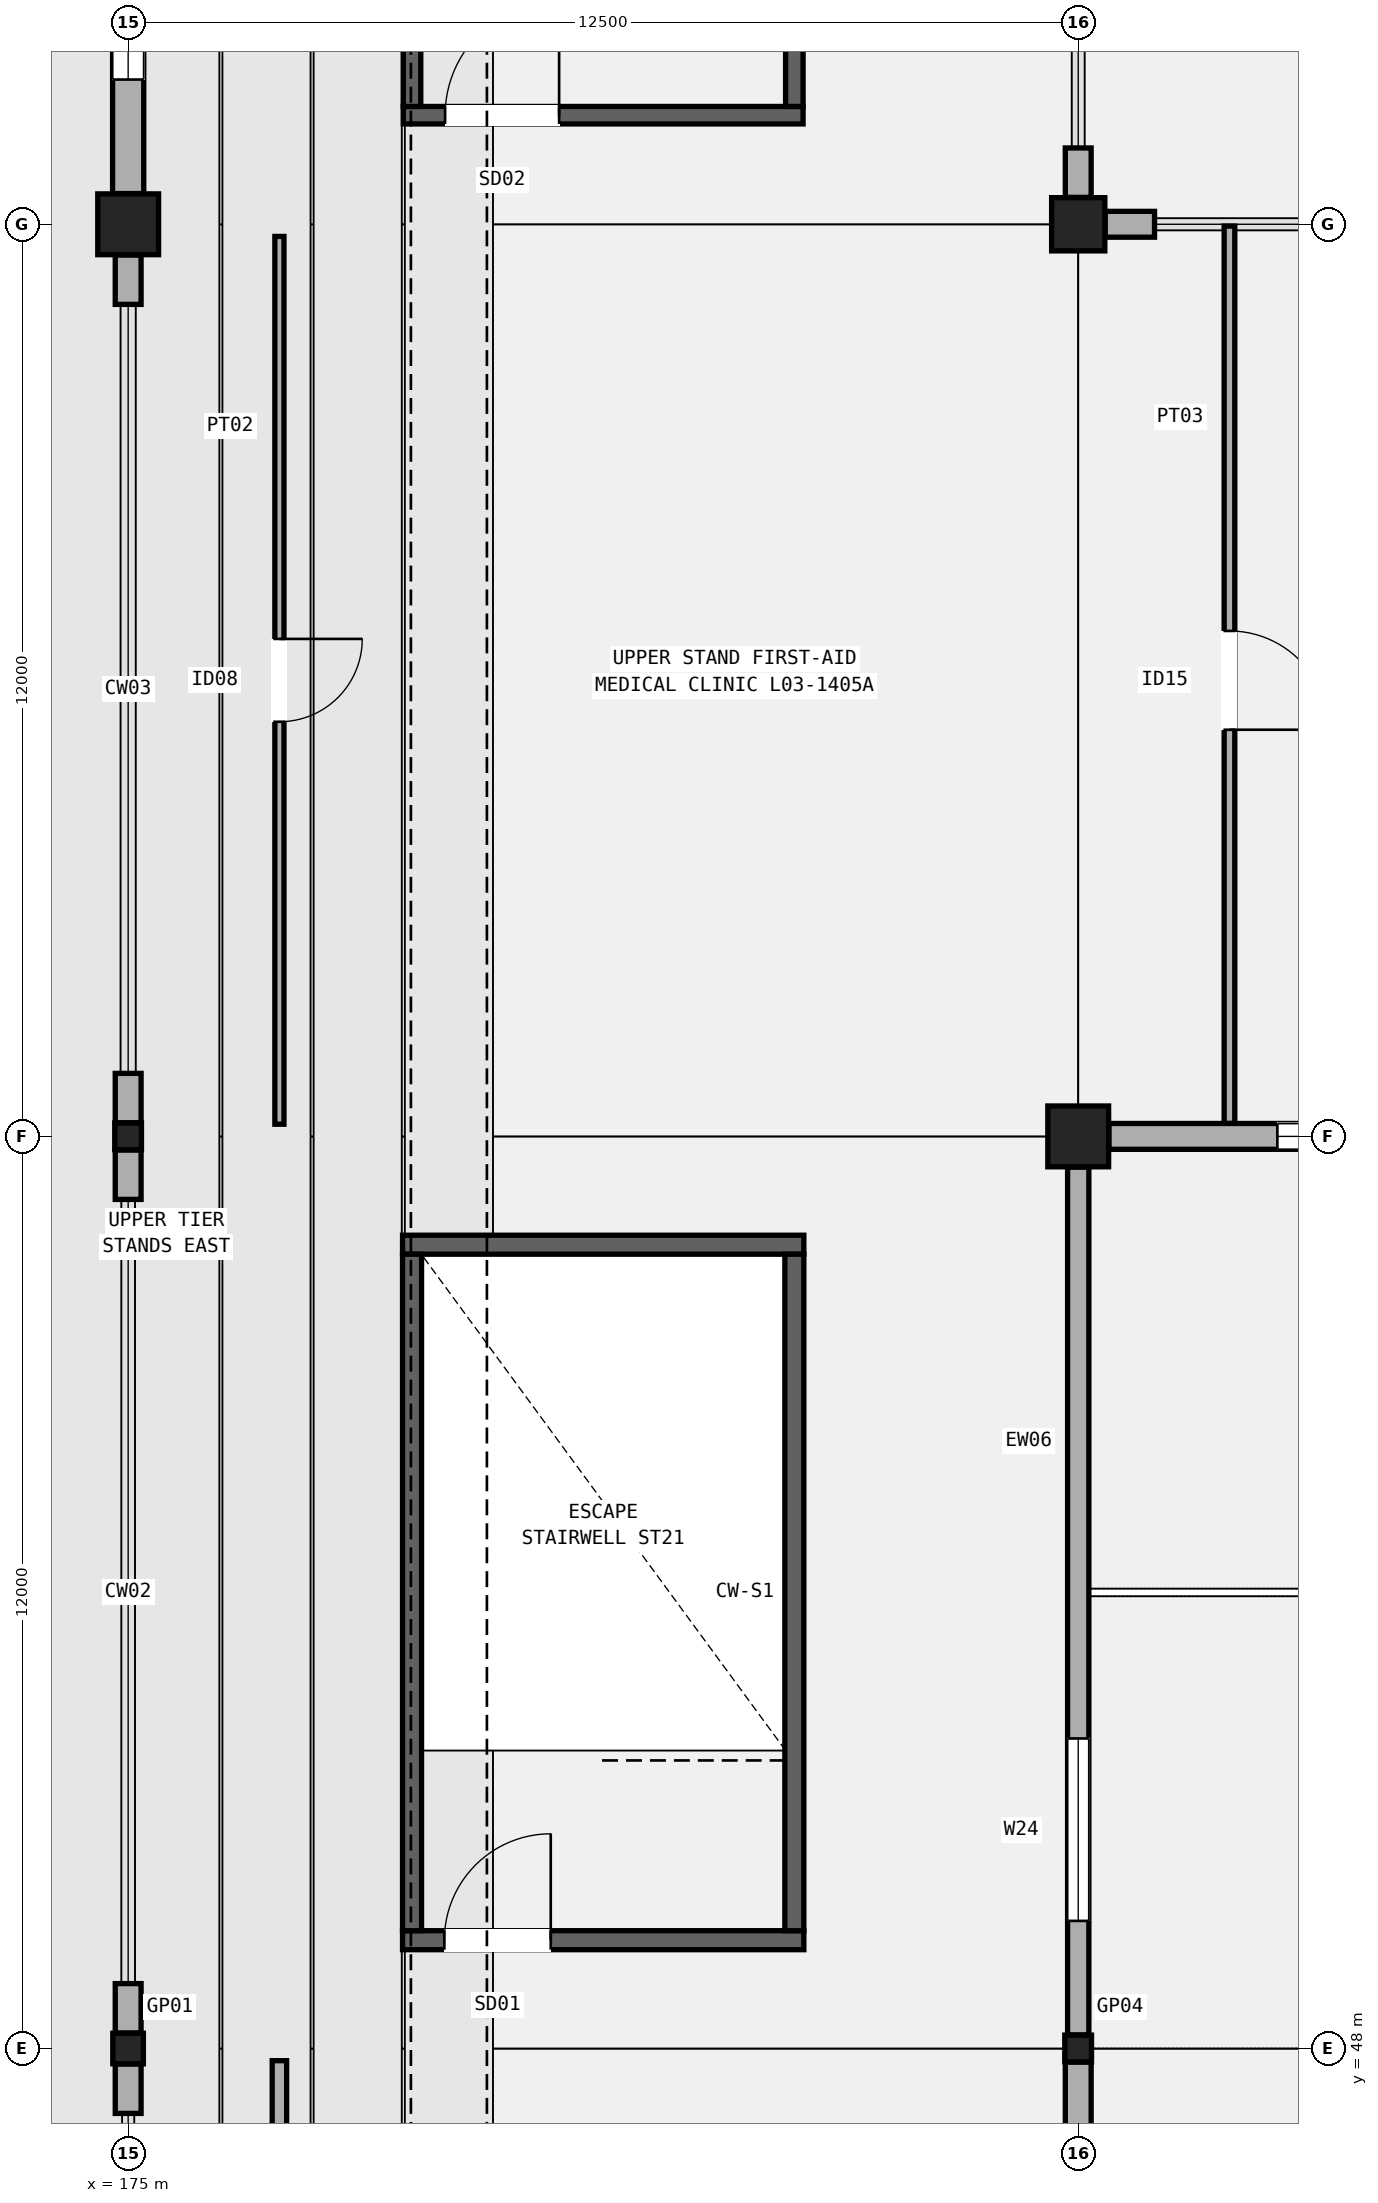
"""IFC4 building model, lengths in metres.
Left out: names, types, materials, properties, quantities, classifications, styles, units other than length and angle.
Written with IfcOpenShell. Run it as: python <this file> out.ifc"""

import sys

from ifc_helpers import new_model, si_unit, direction, frame, frame_2d, origin, origin_2d, place, context, subcontext, project, spatial, rectangle, hollow_rectangle, extrude, element, fill, save


model = new_model("IFC4")
c1 = context("Model", 3, precision=1e-05, world=origin(), true_north=direction((0.0, 1.0)))
c2 = subcontext(c1, "Body", "Model", "MODEL_VIEW")
j1 = project(units=[si_unit("LENGTHUNIT", "METRE"), si_unit("PLANEANGLEUNIT", "RADIAN")], contexts=[c1])
p1 = place(None, origin())
s1 = spatial("IfcSite", under=j1, at=p1, CompositionType="ELEMENT")
p2 = place(p1, origin())
s2 = spatial("IfcBuilding", under=s1, at=p2, CompositionType="ELEMENT")
p3 = place(p2, frame((0.0, 0.0, 15.3)))
s3 = spatial("IfcBuildingStorey", under=s2, at=p3, CompositionType="ELEMENT", Elevation=15.3)
p4 = place(p3, frame((175.0, 48.0, 0.0), z_axis=(0.0, 0.0, 1.0), x_axis=(1.0, 0.0, 0.0)))
e1 = element("IfcColumn", 1, at=p4, inside=s3, PredefinedType="COLUMN", context=c2, shape_type="SweptSolid", body=[
    extrude(hollow_rectangle(XDim=0.4, YDim=0.4, WallThickness=0.016, InnerFilletRadius=0.016, OuterFilletRadius=0.032, at=origin_2d()), origin(), (0.0, 0.0, 1.0), 5.1),
])
p5 = place(p3, frame((175.0, 60.0, 0.0), z_axis=(0.0, 0.0, 1.0), x_axis=(1.0, 0.0, 0.0)))
e2 = element("IfcColumn", 2, at=p5, inside=s3, PredefinedType="COLUMN", context=c2, shape_type="SweptSolid", body=[
    extrude(hollow_rectangle(XDim=0.35, YDim=0.35, WallThickness=0.016, InnerFilletRadius=0.016, OuterFilletRadius=0.032, at=origin_2d()), origin(), (0.0, 0.0, 1.0), 5.1),
])
p6 = place(p3, frame((175.0, 72.0, 0.0), z_axis=(0.0, 0.0, 1.0), x_axis=(1.0, 0.0, 0.0)))
e3 = element("IfcColumn", 3, at=p6, inside=s3, PredefinedType="COLUMN", context=c2, shape_type="SweptSolid", body=[
    extrude(rectangle(XDim=0.8, YDim=0.8, at=origin_2d()), origin(), (0.0, 0.0, 1.0), 5.1),
])
p7 = place(p3, frame((187.5, 48.0, 0.0), z_axis=(0.0, 0.0, 1.0), x_axis=(1.0, 0.0, 0.0)))
e4 = element("IfcColumn", 4, at=p7, inside=s3, PredefinedType="COLUMN", context=c2, shape_type="SweptSolid", body=[
    extrude(hollow_rectangle(XDim=0.35, YDim=0.35, WallThickness=0.016, InnerFilletRadius=0.016, OuterFilletRadius=0.032, at=origin_2d()), origin(), (0.0, 0.0, 1.0), 5.1),
])
p8 = place(p3, frame((187.5, 60.0, 0.0), z_axis=(0.0, 0.0, 1.0), x_axis=(1.0, 0.0, 0.0)))
e5 = element("IfcColumn", 5, at=p8, inside=s3, PredefinedType="COLUMN", context=c2, shape_type="SweptSolid", body=[
    extrude(rectangle(XDim=0.8, YDim=0.8, at=origin_2d()), origin(), (0.0, 0.0, 1.0), 5.1),
])
p9 = place(p3, frame((187.5, 72.0, 0.0), z_axis=(0.0, 0.0, 1.0), x_axis=(1.0, 0.0, 0.0)))
e6 = element("IfcColumn", 6, at=p9, inside=s3, PredefinedType="COLUMN", context=c2, shape_type="SweptSolid", body=[
    extrude(rectangle(XDim=0.7, YDim=0.7, at=origin_2d()), origin(), (0.0, 0.0, 1.0), 5.1),
])
p10 = place(p3, frame((175.0, 47.146, 0.0), z_axis=(0.0, 0.0, 1.0), x_axis=(0.0, 1.0, 0.0)))
e7 = element("IfcWall", 7, at=p10, inside=s3, PredefinedType="SOLIDWALL", context=c2, shape_type="SweptSolid", body=[
    extrude(rectangle(XDim=0.65, YDim=0.34, at=frame_2d((0.325, 0.0))), origin(), (0.0, 0.0, 1.0), 4.172),
])
p11 = place(p3, frame((187.5, 36.204, 0.0), z_axis=(0.0, 0.0, 1.0), x_axis=(0.0, 1.0, 0.0)))
e8 = element("IfcWall", 8, at=p11, inside=s3, PredefinedType="SOLIDWALL", context=c2, shape_type="SweptSolid", body=[
    extrude(rectangle(XDim=11.617, YDim=0.34, at=frame_2d((5.809, 0.0))), origin(), (0.0, 0.0, 1.0), 4.06),
])
p12 = place(p11, frame((1.5, 0.0, 0.95)))
e9 = element("IfcOpeningElement", 9, at=p12, cuts=e8, PredefinedType="OPENING", context=c2, shape_type="SweptSolid", body=[
    extrude(rectangle(XDim=2.4, YDim=1.65, at=frame_2d((1.2, 0.825))), frame((0.0, 0.18, 0.0), z_axis=(0.0, -1.0, 0.0), x_axis=(1.0, 0.0, 0.0)), (0.0, 0.0, 1.0), 0.36),
])
p13 = place(p3, frame((175.0, 48.204, 0.0), z_axis=(0.0, 0.0, 1.0), x_axis=(0.0, 1.0, 0.0)))
e10 = element("IfcWall", 10, at=p13, inside=s3, PredefinedType="SOLIDWALL", context=c2, shape_type="SweptSolid", body=[
    extrude(rectangle(XDim=0.65, YDim=0.34, at=frame_2d((0.325, 0.0))), origin(), (0.0, 0.0, 1.0), 4.06),
])
p14 = place(p3, frame((175.0, 59.171, 0.0), z_axis=(0.0, 0.0, 1.0), x_axis=(0.0, 1.0, 0.0)))
e11 = element("IfcWall", 11, at=p14, inside=s3, PredefinedType="SOLIDWALL", context=c2, shape_type="SweptSolid", body=[
    extrude(rectangle(XDim=0.65, YDim=0.34, at=frame_2d((0.325, 0.0))), origin(), (0.0, 0.0, 1.0), 4.06),
])
p15 = place(p3, frame((187.5, 48.179, 0.0), z_axis=(0.0, 0.0, 1.0), x_axis=(0.0, 1.0, 0.0)))
e12 = element("IfcWall", 12, at=p15, inside=s3, PredefinedType="SOLIDWALL", context=c2, shape_type="SweptSolid", body=[
    extrude(rectangle(XDim=11.417, YDim=0.28, at=frame_2d((5.708, 0.0))), origin(), (0.0, 0.0, 1.0), 4.16),
])
p16 = place(p15, frame((1.5, 0.0, 0.95)))
e13 = element("IfcOpeningElement", 13, at=p16, cuts=e12, PredefinedType="OPENING", context=c2, shape_type="SweptSolid", body=[
    extrude(rectangle(XDim=2.4, YDim=2.05, at=frame_2d((1.2, 1.025))), frame((0.0, 0.15, 0.0), z_axis=(0.0, -1.0, 0.0), x_axis=(1.0, 0.0, 0.0)), (0.0, 0.0, 1.0), 0.3),
])
p17 = place(p3, frame((175.0, 60.179, 0.0), z_axis=(0.0, 0.0, 1.0), x_axis=(0.0, 1.0, 0.0)))
e14 = element("IfcWall", 14, at=p17, inside=s3, PredefinedType="SOLIDWALL", context=c2, shape_type="SweptSolid", body=[
    extrude(rectangle(XDim=0.65, YDim=0.34, at=frame_2d((0.325, 0.0))), origin(), (0.0, 0.0, 1.0), 4.16),
])
p18 = place(p3, frame((175.0, 70.946, 0.0), z_axis=(0.0, 0.0, 1.0), x_axis=(0.0, 1.0, 0.0)))
e15 = element("IfcWall", 15, at=p18, inside=s3, PredefinedType="SOLIDWALL", context=c2, shape_type="SweptSolid", body=[
    extrude(rectangle(XDim=0.65, YDim=0.34, at=frame_2d((0.325, 0.0))), origin(), (0.0, 0.0, 1.0), 4.16),
])
p19 = place(p3, frame((175.0, 72.404, 0.0), z_axis=(0.0, 0.0, 1.0), x_axis=(0.0, 1.0, 0.0)))
e16 = element("IfcWall", 16, at=p19, inside=s3, PredefinedType="SOLIDWALL", context=c2, shape_type="SweptSolid", body=[
    extrude(rectangle(XDim=11.242, YDim=0.41, at=frame_2d((5.621, 0.0))), origin(), (0.0, 0.0, 1.0), 4.172),
])
p20 = place(p19, frame((1.5, 0.0, 0.95)))
e17 = element("IfcOpeningElement", 17, at=p20, cuts=e16, PredefinedType="OPENING", context=c2, shape_type="SweptSolid", body=[
    extrude(rectangle(XDim=2.4, YDim=2.45, at=frame_2d((1.2, 1.225))), frame((0.0, 0.215, 0.0), z_axis=(0.0, -1.0, 0.0), x_axis=(1.0, 0.0, 0.0)), (0.0, 0.0, 1.0), 0.43),
])
p21 = place(p3, frame((187.5, 72.354, 0.0), z_axis=(0.0, 0.0, 1.0), x_axis=(0.0, 1.0, 0.0)))
e18 = element("IfcWall", 18, at=p21, inside=s3, PredefinedType="SOLIDWALL", context=c2, shape_type="SweptSolid", body=[
    extrude(rectangle(XDim=0.65, YDim=0.34, at=frame_2d((0.325, 0.0))), origin(), (0.0, 0.0, 1.0), 4.06),
])
p22 = place(p3, frame((187.904, 60.0, 0.0), z_axis=(0.0, 0.0, 1.0), x_axis=(1.0, 0.0, 0.0)))
e19 = element("IfcWall", 19, at=p22, inside=s3, PredefinedType="SOLIDWALL", context=c2, shape_type="SweptSolid", body=[
    extrude(rectangle(XDim=11.742, YDim=0.34, at=frame_2d((5.871, 0.0))), origin(), (0.0, 0.0, 1.0), 4.172),
])
p23 = place(p22, frame((2.216, 0.0, 0.95)))
e20 = element("IfcOpeningElement", 20, at=p23, cuts=e19, PredefinedType="OPENING", context=c2, shape_type="SweptSolid", body=[
    extrude(rectangle(XDim=3.15, YDim=1.9, at=frame_2d((1.575, 0.95))), frame((0.0, 0.18, 0.0), z_axis=(0.0, -1.0, 0.0), x_axis=(1.0, 0.0, 0.0)), (0.0, 0.0, 1.0), 0.36),
])
p24 = place(p3, frame((187.854, 72.0, 0.0), z_axis=(0.0, 0.0, 1.0), x_axis=(1.0, 0.0, 0.0)))
e21 = element("IfcWall", 21, at=p24, inside=s3, PredefinedType="SOLIDWALL", context=c2, shape_type="SweptSolid", body=[
    extrude(rectangle(XDim=0.65, YDim=0.34, at=frame_2d((0.325, 0.0))), origin(), (0.0, 0.0, 1.0), 4.06),
])
p25 = place(p3, frame((178.61, 49.425, 0.0), z_axis=(0.0, 0.0, 1.0), x_axis=(1.0, 0.0, 0.0)))
e22 = element("IfcWall", 22, at=p25, inside=s3, PredefinedType="SHEAR", context=c2, shape_type="SweptSolid", body=[
    extrude(rectangle(XDim=5.28, YDim=0.25, at=frame_2d((2.64, 0.0))), origin(), (0.0, 0.0, 1.0), 4.86),
])
p26 = place(p25, frame((0.55, 0.0, 0.0)))
e23 = element("IfcOpeningElement", 23, at=p26, cuts=e22, PredefinedType="OPENING", context=c2, shape_type="SweptSolid", body=[
    extrude(rectangle(XDim=1.4, YDim=2.15, at=frame_2d((0.7, 1.075))), frame((0.0, 0.135, 0.0), z_axis=(0.0, -1.0, 0.0), x_axis=(1.0, 0.0, 0.0)), (0.0, 0.0, 1.0), 0.27),
])
p27 = place(p3, frame((178.61, 58.575, 0.0), z_axis=(0.0, 0.0, 1.0), x_axis=(1.0, 0.0, 0.0)))
e24 = element("IfcWall", 24, at=p27, inside=s3, PredefinedType="SHEAR", context=c2, shape_type="SweptSolid", body=[
    extrude(rectangle(XDim=5.28, YDim=0.25, at=frame_2d((2.64, 0.0))), origin(), (0.0, 0.0, 1.0), 4.86),
])
for number, where, z_axis, x_axis in (
    (25, (178.735, 49.55, 0.0), (0.0, 0.0, 1.0), (0.0, 1.0, 0.0)),
    (26, (183.765, 49.55, 0.0), (0.0, 0.0, 1.0), (0.0, 1.0, 0.0)),
):
    element("IfcWall", number, at=place(p3, frame(where, z_axis=z_axis, x_axis=x_axis)), inside=s3, PredefinedType="SHEAR", context=c2, shape_type="SweptSolid", body=[
        extrude(rectangle(XDim=8.9, YDim=0.25, at=frame_2d((4.45, 0.0))), origin(), (0.0, 0.0, 1.0), 4.86),
    ])
p28 = place(p3, frame((178.62, 73.435, 0.0), z_axis=(0.0, 0.0, 1.0), x_axis=(1.0, 0.0, 0.0)))
e27 = element("IfcWall", 27, at=p28, inside=s3, PredefinedType="SHEAR", context=c2, shape_type="SweptSolid", body=[
    extrude(rectangle(XDim=5.26, YDim=0.23, at=frame_2d((2.63, 0.0))), origin(), (0.0, 0.0, 1.0), 4.86),
])
p29 = place(p28, frame((0.55, 0.0, 0.0)))
e28 = element("IfcOpeningElement", 28, at=p29, cuts=e27, PredefinedType="OPENING", context=c2, shape_type="SweptSolid", body=[
    extrude(rectangle(XDim=1.5, YDim=2.2, at=frame_2d((0.75, 1.1))), frame((0.0, 0.125, 0.0), z_axis=(0.0, -1.0, 0.0), x_axis=(1.0, 0.0, 0.0)), (0.0, 0.0, 1.0), 0.25),
])
for number, where, z_axis, x_axis in (
    (29, (178.735, 73.55, 0.0), (0.0, 0.0, 1.0), (0.0, 1.0, 0.0)),
    (30, (183.765, 73.55, 0.0), (0.0, 0.0, 1.0), (0.0, 1.0, 0.0)),
):
    element("IfcWall", number, at=place(p3, frame(where, z_axis=z_axis, x_axis=x_axis)), inside=s3, PredefinedType="SHEAR", context=c2, shape_type="SweptSolid", body=[
        extrude(rectangle(XDim=8.9, YDim=0.23, at=frame_2d((4.45, 0.0))), origin(), (0.0, 0.0, 1.0), 4.86),
    ])
p30 = place(p3, frame((176.99, 37.92, 0.0), z_axis=(0.0, 0.0, 1.0), x_axis=(0.0, 1.0, 0.0)))
e31 = element("IfcWall", 31, at=p30, inside=s3, PredefinedType="PARTITIONING", context=c2, shape_type="SweptSolid", body=[
    extrude(rectangle(XDim=9.92, YDim=0.19, at=frame_2d((4.96, 0.0))), origin(), (0.0, 0.0, 1.0), 2.77),
])
p31 = place(p30, frame((5.49, 0.0, 0.0), z_axis=(0.0, 0.0, 1.0), x_axis=(-1.0, 0.0, 0.0)))
e32 = element("IfcOpeningElement", 32, at=p31, cuts=e31, PredefinedType="OPENING", context=c2, shape_type="SweptSolid", body=[
    extrude(rectangle(XDim=1.06, YDim=2.15, at=frame_2d((0.53, 1.075))), frame((0.0, 0.105, 0.0), z_axis=(0.0, -1.0, 0.0), x_axis=(1.0, 0.0, 0.0)), (0.0, 0.0, 1.0), 0.21),
])
p32 = place(p3, frame((176.99, 60.16, 0.0), z_axis=(0.0, 0.0, 1.0), x_axis=(0.0, 1.0, 0.0)))
e33 = element("IfcWall", 33, at=p32, inside=s3, PredefinedType="PARTITIONING", context=c2, shape_type="SweptSolid", body=[
    extrude(rectangle(XDim=11.68, YDim=0.12, at=frame_2d((5.84, 0.0))), origin(), (0.0, 0.0, 1.0), 2.77),
])
p33 = place(p32, frame((6.385, 0.0, 0.0), z_axis=(0.0, 0.0, 1.0), x_axis=(-1.0, 0.0, 0.0)))
e34 = element("IfcOpeningElement", 34, at=p33, cuts=e33, PredefinedType="OPENING", context=c2, shape_type="SweptSolid", body=[
    extrude(rectangle(XDim=1.09, YDim=2.16, at=frame_2d((0.545, 1.08))), frame((0.0, 0.07, 0.0), z_axis=(0.0, -1.0, 0.0), x_axis=(1.0, 0.0, 0.0)), (0.0, 0.0, 1.0), 0.14),
])
p34 = place(p3, frame((189.49, 60.172, 0.0), z_axis=(0.0, 0.0, 1.0), x_axis=(0.0, 1.0, 0.0)))
e35 = element("IfcWall", 35, at=p34, inside=s3, PredefinedType="PARTITIONING", context=c2, shape_type="SweptSolid", body=[
    extrude(rectangle(XDim=11.804, YDim=0.14, at=frame_2d((5.902, 0.0))), origin(), (0.0, 0.0, 1.0), 4.22),
])
p35 = place(p34, frame((6.478, 0.0, 0.0), z_axis=(0.0, 0.0, 1.0), x_axis=(-1.0, 0.0, 0.0)))
e36 = element("IfcOpeningElement", 36, at=p35, cuts=e35, PredefinedType="OPENING", context=c2, shape_type="SweptSolid", body=[
    extrude(rectangle(XDim=1.3, YDim=2.24, at=frame_2d((0.65, 1.12))), frame((0.0, 0.08, 0.0), z_axis=(0.0, -1.0, 0.0), x_axis=(1.0, 0.0, 0.0)), (0.0, 0.0, 1.0), 0.16),
])
p36 = place(p16, origin())
e37 = element("IfcWindow", 37, at=p36, inside=s3, PartitioningType="SINGLE_PANEL", PredefinedType="WINDOW", context=c2, shape_type="SweptSolid", body=[
    extrude(rectangle(XDim=2.4, YDim=2.05, at=frame_2d((1.2, 1.025))), frame((0.0, 0.03, 0.0), z_axis=(0.0, -1.0, 0.0), x_axis=(1.0, 0.0, 0.0)), (0.0, 0.0, 1.0), 0.06),
])
fill(e13, e37)
p37 = place(p20, origin())
e38 = element("IfcWindow", 38, at=p37, inside=s3, PartitioningType="SINGLE_PANEL", PredefinedType="WINDOW", context=c2, shape_type="SweptSolid", body=[
    extrude(rectangle(XDim=2.4, YDim=2.45, at=frame_2d((1.2, 1.225))), frame((0.0, 0.03, 0.0), z_axis=(0.0, -1.0, 0.0), x_axis=(1.0, 0.0, 0.0)), (0.0, 0.0, 1.0), 0.06),
])
fill(e17, e38)
p38 = place(p23, origin())
e39 = element("IfcWindow", 39, at=p38, inside=s3, PartitioningType="SINGLE_PANEL", PredefinedType="WINDOW", context=c2, shape_type="SweptSolid", body=[
    extrude(rectangle(XDim=3.15, YDim=1.9, at=frame_2d((1.575, 0.95))), frame((0.0, 0.03, 0.0), z_axis=(0.0, -1.0, 0.0), x_axis=(1.0, 0.0, 0.0)), (0.0, 0.0, 1.0), 0.06),
])
fill(e20, e39)
p39 = place(p26, origin())
e40 = element("IfcDoor", 40, at=p39, inside=s3, OperationType="SINGLE_SWING_RIGHT", PredefinedType="DOOR", context=c2, shape_type="SweptSolid", body=[
    extrude(rectangle(XDim=1.4, YDim=2.15, at=frame_2d((0.7, 1.075))), frame((0.0, 0.025, 0.0), z_axis=(0.0, -1.0, 0.0), x_axis=(1.0, 0.0, 0.0)), (0.0, 0.0, 1.0), 0.05),
])
fill(e23, e40)
p40 = place(p29, origin())
e41 = element("IfcDoor", 41, at=p40, inside=s3, OperationType="SINGLE_SWING_RIGHT", PredefinedType="DOOR", context=c2, shape_type="SweptSolid", body=[
    extrude(rectangle(XDim=1.5, YDim=2.2, at=frame_2d((0.75, 1.1))), frame((0.0, 0.025, 0.0), z_axis=(0.0, -1.0, 0.0), x_axis=(1.0, 0.0, 0.0)), (0.0, 0.0, 1.0), 0.05),
])
fill(e28, e41)
p41 = place(p33, origin())
e42 = element("IfcDoor", 42, at=p41, inside=s3, OperationType="SINGLE_SWING_LEFT", PredefinedType="DOOR", context=c2, shape_type="SweptSolid", body=[
    extrude(rectangle(XDim=1.09, YDim=2.16, at=frame_2d((0.545, 1.08))), frame((0.0, 0.025, 0.0), z_axis=(0.0, -1.0, 0.0), x_axis=(1.0, 0.0, 0.0)), (0.0, 0.0, 1.0), 0.05),
])
fill(e34, e42)
p42 = place(p35, origin())
e43 = element("IfcDoor", 43, at=p42, inside=s3, OperationType="SINGLE_SWING_RIGHT", PredefinedType="DOOR", context=c2, shape_type="SweptSolid", body=[
    extrude(rectangle(XDim=1.3, YDim=2.24, at=frame_2d((0.65, 1.12))), frame((0.0, 0.025, 0.0), z_axis=(0.0, -1.0, 0.0), x_axis=(1.0, 0.0, 0.0)), (0.0, 0.0, 1.0), 0.05),
])
fill(e36, e43)
save(model, sys.argv[1])
